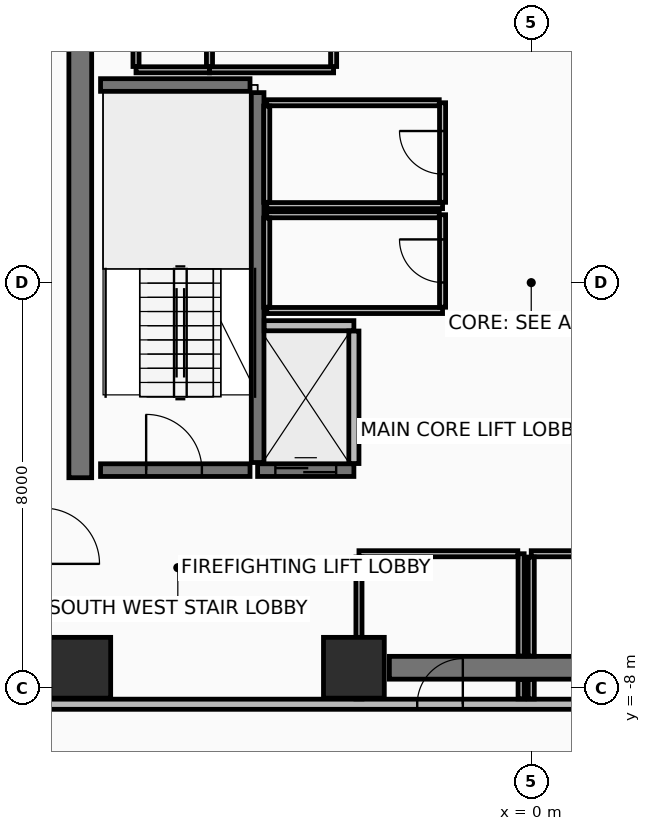
"""IFC4 building model, lengths in metres.
Left out: names, types, materials, properties, quantities, classifications, styles, units other than length and angle.
Written with IfcOpenShell. Run it as: python <this file> out.ifc"""

import sys

from ifc_helpers import new_model, si_unit, direction, frame, frame_2d, origin, origin_2d, place, context, subcontext, project, spatial, rectangle, extrude, element, fill, save


model = new_model("IFC4")
c1 = context("Model", 3, precision=1e-05, world=origin(), true_north=direction((0.0, 1.0)))
c2 = subcontext(c1, "Body", "Model", "MODEL_VIEW")
j1 = project(units=[si_unit("LENGTHUNIT", "METRE"), si_unit("PLANEANGLEUNIT", "RADIAN")], contexts=[c1])
p1 = place(None, origin())
s1 = spatial("IfcSite", under=j1, at=p1, CompositionType="ELEMENT")
p2 = place(p1, origin())
s2 = spatial("IfcBuilding", under=s1, at=p2, CompositionType="ELEMENT")
p3 = place(p2, frame((0.0, 0.0, 112.45)))
s3 = spatial("IfcBuildingStorey", under=s2, at=p3, CompositionType="ELEMENT", Elevation=112.45)
for number, where, z_axis, x_axis in (
    (1, (-8.9, -7.6, 0.0), (0.0, 0.0, 1.0), (1.0, 0.0, 0.0)),
    (2, (-3.5, -7.6, 0.0), (0.0, 0.0, 1.0), (1.0, 0.0, 0.0)),
):
    element("IfcColumn", number, at=place(p3, frame(where, z_axis=z_axis, x_axis=x_axis)), inside=s3, PredefinedType="COLUMN", context=c2, shape_type="SweptSolid", body=[
        extrude(rectangle(XDim=1.2, YDim=1.2, at=origin_2d()), origin(), (0.0, 0.0, 1.0), 3.6),
    ])
p4 = place(p3, frame((-2.8, -7.6, 0.0), z_axis=(0.0, 0.0, 1.0), x_axis=(1.0, 0.0, 0.0)))
e3 = element("IfcWall", 3, at=p4, inside=s3, PredefinedType="SHEAR", context=c2, shape_type="SweptSolid", body=[
    extrude(rectangle(XDim=5.38, YDim=0.45, at=frame_2d((2.69, 0.0))), origin(), (0.0, 0.0, 1.0), 3.41),
])
p5 = place(p3, frame((-8.9, -3.85, 0.0), z_axis=(0.0, 0.0, 1.0), x_axis=(0.0, 1.0, 0.0)))
e4 = element("IfcWall", 4, at=p5, inside=s3, PredefinedType="SHEAR", context=c2, shape_type="SweptSolid", body=[
    extrude(rectangle(XDim=10.7, YDim=0.45, at=frame_2d((5.35, 0.0))), origin(), (0.0, 0.0, 1.0), 3.41),
])
p6 = place(p3, frame((-9.62, -8.32, 0.0), z_axis=(0.0, 0.0, 1.0), x_axis=(1.0, 0.0, 0.0)))
e5 = element("IfcWall", 5, at=p6, inside=s3, PredefinedType="PARTITIONING", context=c2, shape_type="SweptSolid", body=[
    extrude(rectangle(XDim=19.24, YDim=0.2, at=frame_2d((9.62, 0.0))), origin(), (0.0, 0.0, 1.0), 2.855),
])
p7 = place(p6, frame((7.37, 0.0, 0.0)))
e6 = element("IfcOpeningElement", 6, at=p7, cuts=e5, PredefinedType="OPENING", context=c2, shape_type="SweptSolid", body=[
    extrude(rectangle(XDim=0.9, YDim=2.1, at=frame_2d((0.45, 1.05))), frame((0.0, 0.11, 0.0), z_axis=(0.0, -1.0, 0.0), x_axis=(1.0, 0.0, 0.0)), (0.0, 0.0, 1.0), 0.22),
])
p8 = place(p6, frame((10.77, 0.0, 0.0)))
e7 = element("IfcOpeningElement", 7, at=p8, cuts=e5, PredefinedType="OPENING", context=c2, shape_type="SweptSolid", body=[
    extrude(rectangle(XDim=0.9, YDim=2.1, at=frame_2d((0.45, 1.05))), frame((0.0, 0.11, 0.0), z_axis=(0.0, -1.0, 0.0), x_axis=(1.0, 0.0, 0.0)), (0.0, 0.0, 1.0), 0.22),
])
p9 = place(p6, frame((13.97, 0.0, 0.0)))
e8 = element("IfcOpeningElement", 8, at=p9, cuts=e5, PredefinedType="OPENING", context=c2, shape_type="SweptSolid", body=[
    extrude(rectangle(XDim=0.9, YDim=2.1, at=frame_2d((0.45, 1.05))), frame((0.0, 0.11, 0.0), z_axis=(0.0, -1.0, 0.0), x_axis=(1.0, 0.0, 0.0)), (0.0, 0.0, 1.0), 0.22),
])
p10 = place(p3, frame((-5.4, -3.55, 0.0), z_axis=(0.0, 0.0, 1.0), x_axis=(0.0, 1.0, 0.0)))
e9 = element("IfcWall", 9, at=p10, inside=s3, PredefinedType="SHEAR", context=c2, shape_type="SweptSolid", body=[
    extrude(rectangle(XDim=7.3, YDim=0.25, at=frame_2d((3.65, 0.0))), origin(), (0.0, 0.0, 1.0), 3.41),
])
p11 = place(p3, frame((-8.5, -3.7, 0.0), z_axis=(0.0, 0.0, 1.0), x_axis=(1.0, 0.0, 0.0)))
e10 = element("IfcWall", 10, at=p11, inside=s3, PredefinedType="SHEAR", context=c2, shape_type="SweptSolid", body=[
    extrude(rectangle(XDim=2.95, YDim=0.25, at=frame_2d((1.475, 0.0))), origin(), (0.0, 0.0, 1.0), 3.41),
])
p12 = place(p11, frame((0.9, 0.0, 0.0)))
e11 = element("IfcOpeningElement", 11, at=p12, cuts=e10, PredefinedType="OPENING", context=c2, shape_type="SweptSolid", body=[
    extrude(rectangle(XDim=1.1, YDim=2.15, at=frame_2d((0.55, 1.075))), frame((0.0, 0.135, 0.0), z_axis=(0.0, -1.0, 0.0), x_axis=(1.0, 0.0, 0.0)), (0.0, 0.0, 1.0), 0.27),
])
p13 = place(p3, frame((-8.5, 3.9, 0.0), z_axis=(0.0, 0.0, 1.0), x_axis=(1.0, 0.0, 0.0)))
e12 = element("IfcWall", 12, at=p13, inside=s3, PredefinedType="SHEAR", context=c2, shape_type="SweptSolid", body=[
    extrude(rectangle(XDim=2.95, YDim=0.25, at=frame_2d((1.475, 0.0))), origin(), (0.0, 0.0, 1.0), 3.41),
])
p14 = place(p3, frame((-5.4, -3.7, 0.0), z_axis=(0.0, 0.0, 1.0), x_axis=(1.0, 0.0, 0.0)))
e13 = element("IfcWall", 13, at=p14, inside=s3, PredefinedType="SHEAR", context=c2, shape_type="SweptSolid", body=[
    extrude(rectangle(XDim=1.9, YDim=0.25, at=frame_2d((0.95, 0.0))), origin(), (0.0, 0.0, 1.0), 3.41),
])
p15 = place(p14, frame((0.35, 0.0, 0.0)))
e14 = element("IfcOpeningElement", 14, at=p15, cuts=e13, PredefinedType="OPENING", context=c2, shape_type="SweptSolid", body=[
    extrude(rectangle(XDim=1.2, YDim=2.2, at=frame_2d((0.6, 1.1))), frame((0.0, 0.135, 0.0), z_axis=(0.0, -1.0, 0.0), x_axis=(1.0, 0.0, 0.0)), (0.0, 0.0, 1.0), 0.27),
])
p16 = place(p3, frame((-5.27, -0.85, 0.0), z_axis=(0.0, 0.0, 1.0), x_axis=(1.0, 0.0, 0.0)))
e15 = element("IfcWall", 15, at=p16, inside=s3, PredefinedType="PARTITIONING", context=c2, shape_type="SweptSolid", body=[
    extrude(rectangle(XDim=1.77, YDim=0.2, at=frame_2d((0.885, 0.0))), origin(), (0.0, 0.0, 1.0), 3.41),
])
p17 = place(p3, frame((-3.5, -3.57, 0.0), z_axis=(0.0, 0.0, 1.0), x_axis=(0.0, 1.0, 0.0)))
e16 = element("IfcWall", 16, at=p17, inside=s3, PredefinedType="PARTITIONING", context=c2, shape_type="SweptSolid", body=[
    extrude(rectangle(XDim=2.615, YDim=0.2, at=frame_2d((1.308, 0.0))), origin(), (0.0, 0.0, 1.0), 3.41),
])
p18 = place(p3, frame((-5.22, 1.52, 0.0), z_axis=(0.0, 0.0, 1.0), x_axis=(1.0, 0.0, 0.0)))
e17 = element("IfcWall", 17, at=p18, inside=s3, PredefinedType="PARTITIONING", context=c2, shape_type="SweptSolid", body=[
    extrude(rectangle(XDim=3.47, YDim=0.12, at=frame_2d((1.735, 0.0))), origin(), (0.0, 0.0, 1.0), 3.41),
])
p19 = place(p3, frame((-1.75, 1.585, 0.0), z_axis=(0.0, 0.0, 1.0), x_axis=(0.0, 1.0, 0.0)))
e18 = element("IfcWall", 18, at=p19, inside=s3, PredefinedType="PARTITIONING", context=c2, shape_type="SweptSolid", body=[
    extrude(rectangle(XDim=1.965, YDim=0.12, at=frame_2d((0.982, 0.0))), origin(), (0.0, 0.0, 1.0), 3.41),
])
p20 = place(p19, frame((0.557, 0.0, 0.0)))
e19 = element("IfcOpeningElement", 19, at=p20, cuts=e18, PredefinedType="OPENING", context=c2, shape_type="SweptSolid", body=[
    extrude(rectangle(XDim=0.85, YDim=2.1, at=frame_2d((0.425, 1.05))), frame((0.0, 0.07, 0.0), z_axis=(0.0, -1.0, 0.0), x_axis=(1.0, 0.0, 0.0)), (0.0, 0.0, 1.0), 0.14),
])
p21 = place(p3, frame((-1.815, 3.55, 0.0), z_axis=(0.0, 0.0, 1.0), x_axis=(-1.0, 0.0, 0.0)))
e20 = element("IfcWall", 20, at=p21, inside=s3, PredefinedType="PARTITIONING", context=c2, shape_type="SweptSolid", body=[
    extrude(rectangle(XDim=3.405, YDim=0.12, at=frame_2d((1.703, 0.0))), origin(), (0.0, 0.0, 1.0), 3.41),
])
p22 = place(p3, frame((-5.22, 3.485, 0.0), z_axis=(0.0, 0.0, 1.0), x_axis=(0.0, -1.0, 0.0)))
e21 = element("IfcWall", 21, at=p22, inside=s3, PredefinedType="PARTITIONING", context=c2, shape_type="SweptSolid", body=[
    extrude(rectangle(XDim=1.9, YDim=0.12, at=frame_2d((0.95, 0.0))), origin(), (0.0, 0.0, 1.0), 3.41),
])
p23 = place(p3, frame((-5.22, -0.55, 0.0), z_axis=(0.0, 0.0, 1.0), x_axis=(1.0, 0.0, 0.0)))
e22 = element("IfcWall", 22, at=p23, inside=s3, PredefinedType="PARTITIONING", context=c2, shape_type="SweptSolid", body=[
    extrude(rectangle(XDim=3.47, YDim=0.12, at=frame_2d((1.735, 0.0))), origin(), (0.0, 0.0, 1.0), 3.41),
])
p24 = place(p3, frame((-1.75, -0.485, 0.0), z_axis=(0.0, 0.0, 1.0), x_axis=(0.0, 1.0, 0.0)))
e23 = element("IfcWall", 23, at=p24, inside=s3, PredefinedType="PARTITIONING", context=c2, shape_type="SweptSolid", body=[
    extrude(rectangle(XDim=1.825, YDim=0.12, at=frame_2d((0.913, 0.0))), origin(), (0.0, 0.0, 1.0), 3.41),
])
p25 = place(p24, frame((0.488, 0.0, 0.0)))
e24 = element("IfcOpeningElement", 24, at=p25, cuts=e23, PredefinedType="OPENING", context=c2, shape_type="SweptSolid", body=[
    extrude(rectangle(XDim=0.85, YDim=2.1, at=frame_2d((0.425, 1.05))), frame((0.0, 0.07, 0.0), z_axis=(0.0, -1.0, 0.0), x_axis=(1.0, 0.0, 0.0)), (0.0, 0.0, 1.0), 0.14),
])
p26 = place(p3, frame((-1.815, 1.34, 0.0), z_axis=(0.0, 0.0, 1.0), x_axis=(-1.0, 0.0, 0.0)))
e25 = element("IfcWall", 25, at=p26, inside=s3, PredefinedType="PARTITIONING", context=c2, shape_type="SweptSolid", body=[
    extrude(rectangle(XDim=3.405, YDim=0.12, at=frame_2d((1.703, 0.0))), origin(), (0.0, 0.0, 1.0), 3.41),
])
p27 = place(p3, frame((-5.22, 1.275, 0.0), z_axis=(0.0, 0.0, 1.0), x_axis=(0.0, -1.0, 0.0)))
e26 = element("IfcWall", 26, at=p27, inside=s3, PredefinedType="PARTITIONING", context=c2, shape_type="SweptSolid", body=[
    extrude(rectangle(XDim=1.76, YDim=0.12, at=frame_2d((0.88, 0.0))), origin(), (0.0, 0.0, 1.0), 3.41),
])
p28 = place(p3, frame((-0.2, -8.215, 0.0), z_axis=(0.0, 0.0, 1.0), x_axis=(0.0, 1.0, 0.0)))
e27 = element("IfcWall", 27, at=p28, inside=s3, PredefinedType="PARTITIONING", context=c2, shape_type="SweptSolid", body=[
    extrude(rectangle(XDim=0.385, YDim=0.12, at=frame_2d((0.192, 0.0))), origin(), (0.0, 0.0, 1.0), 2.605),
])
p29 = place(p3, frame((-0.2, -7.37, 0.0), z_axis=(0.0, 0.0, 1.0), x_axis=(0.0, 1.0, 0.0)))
e28 = element("IfcWall", 28, at=p29, inside=s3, PredefinedType="PARTITIONING", context=c2, shape_type="SweptSolid", body=[
    extrude(rectangle(XDim=2.02, YDim=0.12, at=frame_2d((1.01, 0.0))), origin(), (0.0, 0.0, 1.0), 2.605),
])
p30 = place(p3, frame((-0.265, -5.35, 0.0), z_axis=(0.0, 0.0, 1.0), x_axis=(-1.0, 0.0, 0.0)))
e29 = element("IfcWall", 29, at=p30, inside=s3, PredefinedType="PARTITIONING", context=c2, shape_type="SweptSolid", body=[
    extrude(rectangle(XDim=3.135, YDim=0.12, at=frame_2d((1.567, 0.0))), origin(), (0.0, 0.0, 1.0), 2.605),
])
p31 = place(p3, frame((-3.4, -5.415, 0.0), z_axis=(0.0, 0.0, 1.0), x_axis=(0.0, -1.0, 0.0)))
e30 = element("IfcWall", 30, at=p31, inside=s3, PredefinedType="PARTITIONING", context=c2, shape_type="SweptSolid", body=[
    extrude(rectangle(XDim=2.8, YDim=0.12, at=frame_2d((1.4, 0.0))), origin(), (0.0, 0.0, 1.0), 2.605),
])
p32 = place(p3, frame((3.135, -5.35, 0.0), z_axis=(0.0, 0.0, 1.0), x_axis=(-1.0, 0.0, 0.0)))
e31 = element("IfcWall", 31, at=p32, inside=s3, PredefinedType="PARTITIONING", context=c2, shape_type="SweptSolid", body=[
    extrude(rectangle(XDim=3.135, YDim=0.12, at=frame_2d((1.567, 0.0))), origin(), (0.0, 0.0, 1.0), 3.41),
])
p33 = place(p3, frame((0.0, -5.415, 0.0), z_axis=(0.0, 0.0, 1.0), x_axis=(0.0, -1.0, 0.0)))
e32 = element("IfcWall", 32, at=p33, inside=s3, PredefinedType="PARTITIONING", context=c2, shape_type="SweptSolid", body=[
    extrude(rectangle(XDim=1.955, YDim=0.12, at=frame_2d((0.978, 0.0))), origin(), (0.0, 0.0, 1.0), 2.605),
])
p34 = place(p3, frame((0.0, -7.83, 0.0), z_axis=(0.0, 0.0, 1.0), x_axis=(0.0, -1.0, 0.0)))
e33 = element("IfcWall", 33, at=p34, inside=s3, PredefinedType="PARTITIONING", context=c2, shape_type="SweptSolid", body=[
    extrude(rectangle(XDim=0.385, YDim=0.12, at=frame_2d((0.192, 0.0))), origin(), (0.0, 0.0, 1.0), 2.605),
])
p35 = place(p3, frame((-7.8, 4.2, 0.0), z_axis=(0.0, 0.0, 1.0), x_axis=(1.0, 0.0, 0.0)))
e34 = element("IfcWall", 34, at=p35, inside=s3, PredefinedType="PARTITIONING", context=c2, shape_type="SweptSolid", body=[
    extrude(rectangle(XDim=1.45, YDim=0.12, at=frame_2d((0.725, 0.0))), origin(), (0.0, 0.0, 1.0), 3.41),
])
for number, where, z_axis, x_axis in (
    (35, (-6.35, 4.265, 0.0), (0.0, 0.0, 1.0), (0.0, 1.0, 0.0)),
    (36, (-7.8, 8.215, 0.0), (0.0, 0.0, 1.0), (0.0, -1.0, 0.0)),
):
    element("IfcWall", number, at=place(p3, frame(where, z_axis=z_axis, x_axis=x_axis)), inside=s3, PredefinedType="PARTITIONING", context=c2, shape_type="SweptSolid", body=[
        extrude(rectangle(XDim=3.95, YDim=0.12, at=frame_2d((1.975, 0.0))), origin(), (0.0, 0.0, 1.0), 2.605),
    ])
p36 = place(p3, frame((-6.35, 4.2, 0.0), z_axis=(0.0, 0.0, 1.0), x_axis=(1.0, 0.0, 0.0)))
e37 = element("IfcWall", 37, at=p36, inside=s3, PredefinedType="PARTITIONING", context=c2, shape_type="SweptSolid", body=[
    extrude(rectangle(XDim=2.45, YDim=0.12, at=frame_2d((1.225, 0.0))), origin(), (0.0, 0.0, 1.0), 3.41),
])
p37 = place(p3, frame((-3.9, 4.265, 0.0), z_axis=(0.0, 0.0, 1.0), x_axis=(0.0, 1.0, 0.0)))
e38 = element("IfcWall", 38, at=p37, inside=s3, PredefinedType="PARTITIONING", context=c2, shape_type="SweptSolid", body=[
    extrude(rectangle(XDim=3.95, YDim=0.12, at=frame_2d((1.975, 0.0))), origin(), (0.0, 0.0, 1.0), 2.605),
])
p38 = place(p12, origin())
e39 = element("IfcDoor", 39, at=p38, inside=s3, OperationType="SINGLE_SWING_LEFT", PredefinedType="DOOR", context=c2, shape_type="SweptSolid", body=[
    extrude(rectangle(XDim=1.1, YDim=2.15, at=frame_2d((0.55, 1.075))), frame((0.0, 0.025, 0.0), z_axis=(0.0, -1.0, 0.0), x_axis=(1.0, 0.0, 0.0)), (0.0, 0.0, 1.0), 0.05),
])
fill(e11, e39)
p39 = place(p15, origin())
e40 = element("IfcDoor", 40, at=p39, inside=s3, OperationType="SLIDING_TO_RIGHT", PredefinedType="DOOR", context=c2, shape_type="SweptSolid", body=[
    extrude(rectangle(XDim=1.2, YDim=2.2, at=frame_2d((0.6, 1.1))), frame((0.0, 0.025, 0.0), z_axis=(0.0, -1.0, 0.0), x_axis=(1.0, 0.0, 0.0)), (0.0, 0.0, 1.0), 0.05),
])
fill(e14, e40)
p40 = place(p20, frame((0.85, 0.0, 0.0), z_axis=(0.0, 0.0, 1.0), x_axis=(-1.0, 0.0, 0.0)))
e41 = element("IfcDoor", 41, at=p40, inside=s3, OperationType="SINGLE_SWING_RIGHT", PredefinedType="DOOR", context=c2, shape_type="SweptSolid", body=[
    extrude(rectangle(XDim=0.85, YDim=2.1, at=frame_2d((0.425, 1.05))), frame((0.0, 0.025, 0.0), z_axis=(0.0, -1.0, 0.0), x_axis=(1.0, 0.0, 0.0)), (0.0, 0.0, 1.0), 0.05),
])
fill(e19, e41)
p41 = place(p25, frame((0.85, 0.0, 0.0), z_axis=(0.0, 0.0, 1.0), x_axis=(-1.0, 0.0, 0.0)))
e42 = element("IfcDoor", 42, at=p41, inside=s3, OperationType="SINGLE_SWING_RIGHT", PredefinedType="DOOR", context=c2, shape_type="SweptSolid", body=[
    extrude(rectangle(XDim=0.85, YDim=2.1, at=frame_2d((0.425, 1.05))), frame((0.0, 0.025, 0.0), z_axis=(0.0, -1.0, 0.0), x_axis=(1.0, 0.0, 0.0)), (0.0, 0.0, 1.0), 0.05),
])
fill(e24, e42)
p42 = place(p7, frame((0.9, 0.0, 0.0), z_axis=(0.0, 0.0, 1.0), x_axis=(-1.0, 0.0, 0.0)))
e43 = element("IfcDoor", 43, at=p42, inside=s3, OperationType="SINGLE_SWING_LEFT", PredefinedType="DOOR", context=c2, shape_type="SweptSolid", body=[
    extrude(rectangle(XDim=0.9, YDim=2.1, at=frame_2d((0.45, 1.05))), frame((0.0, 0.025, 0.0), z_axis=(0.0, -1.0, 0.0), x_axis=(1.0, 0.0, 0.0)), (0.0, 0.0, 1.0), 0.05),
])
fill(e6, e43)
save(model, sys.argv[1])
